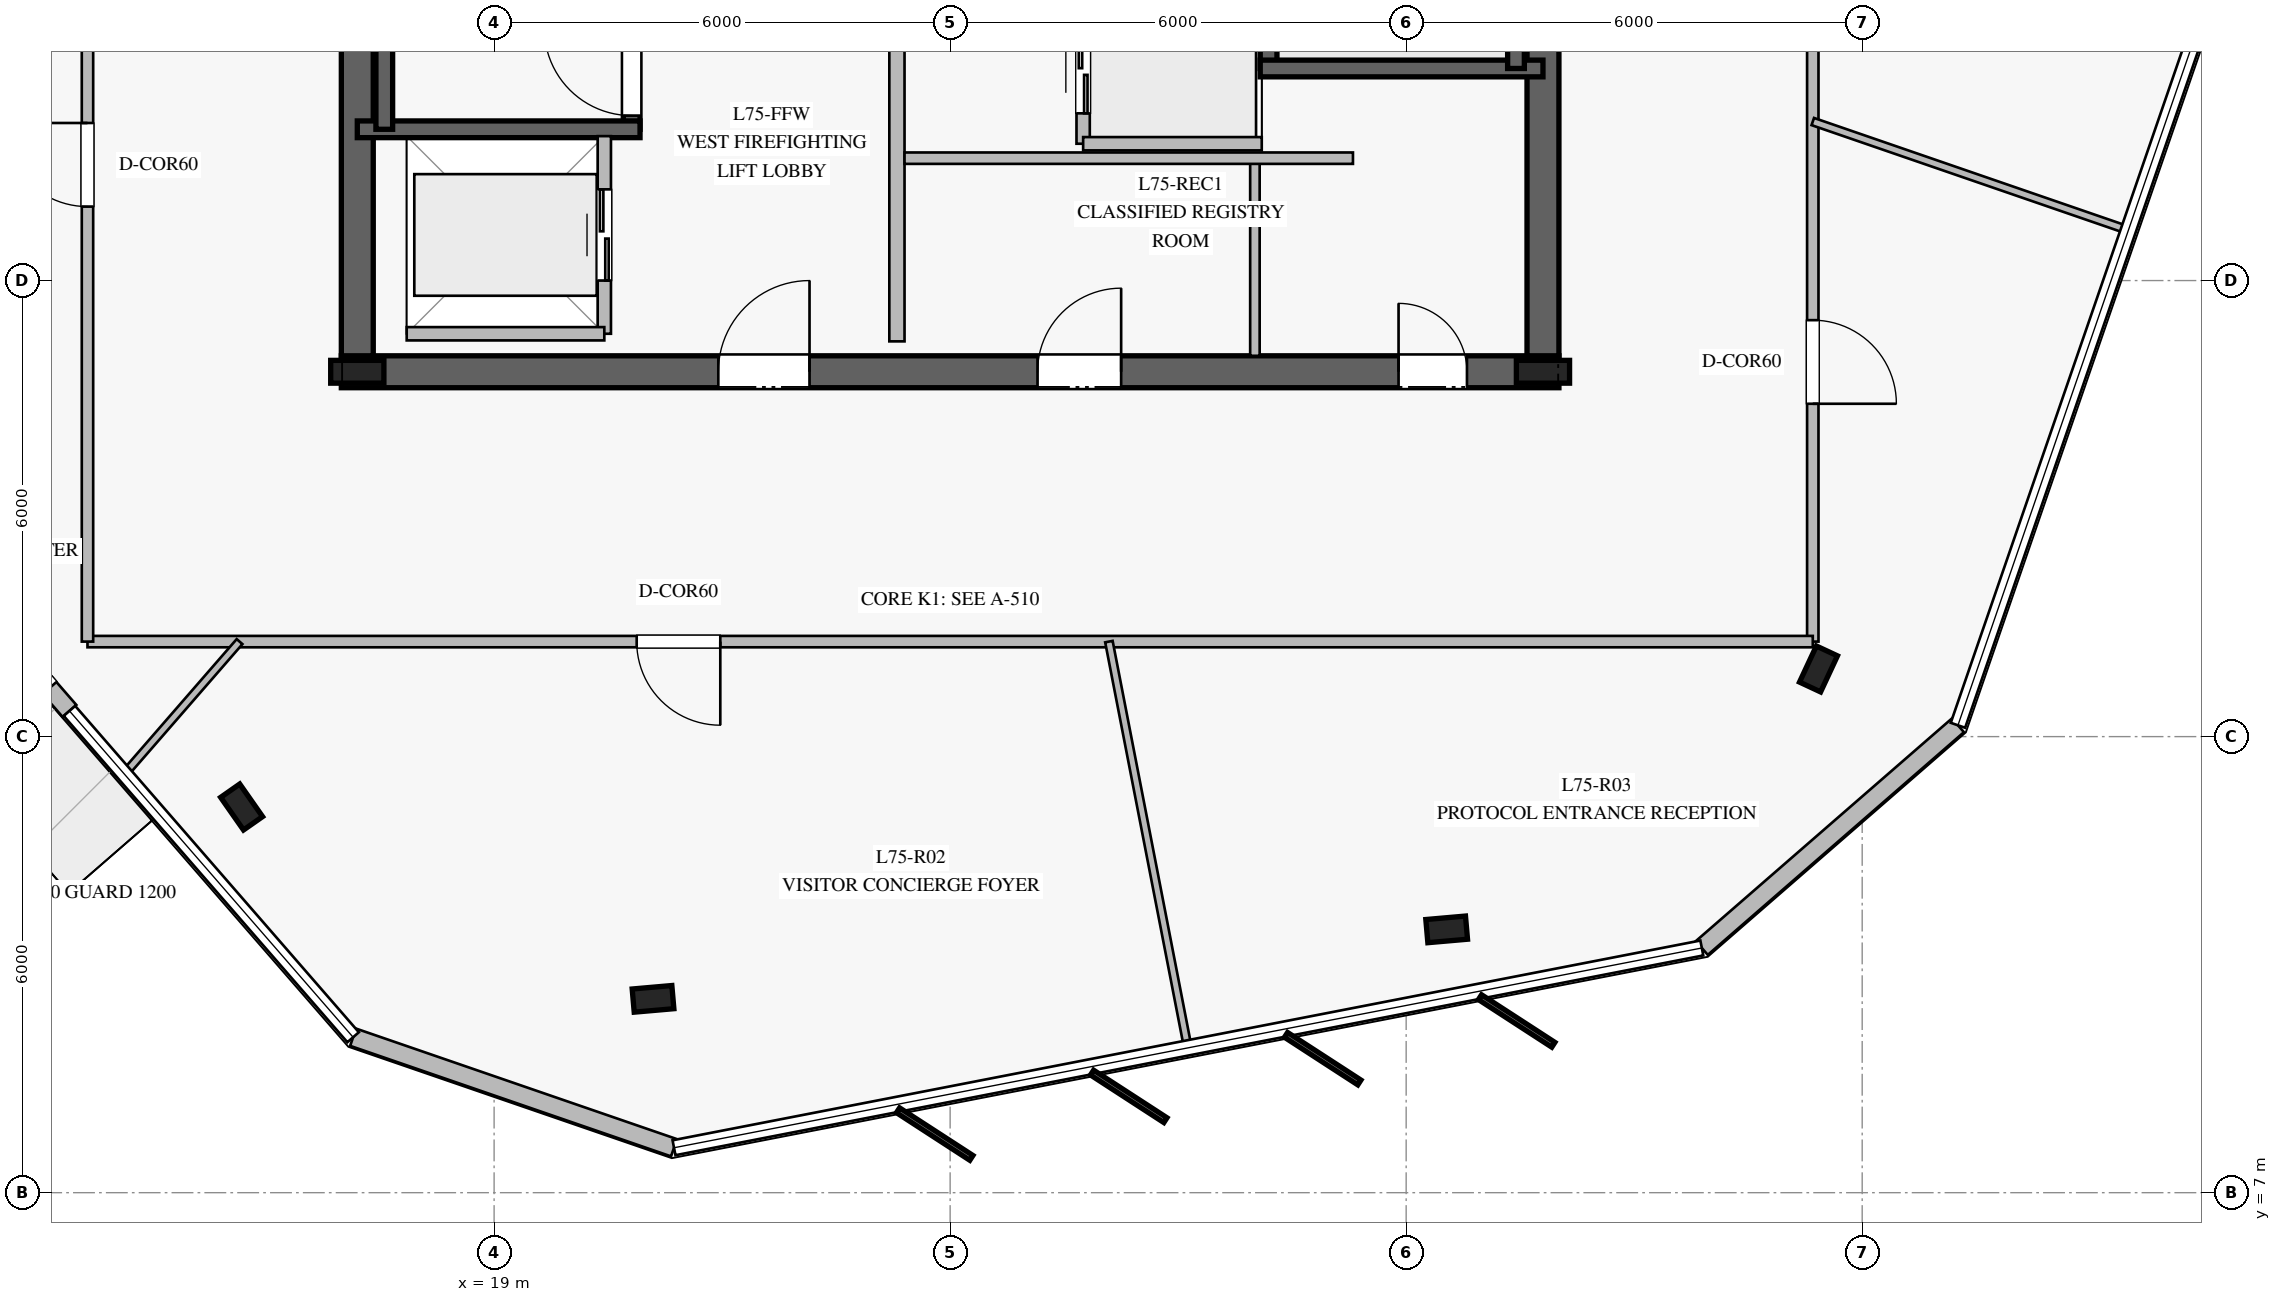
"""IFC4 building model, lengths in metres.
Left out: names, types, materials, properties, quantities, classifications, styles, units other than length and angle.
Written with IfcOpenShell. Run it as: python <this file> out.ifc"""

import sys

from ifc_helpers import new_model, si_unit, direction, frame, frame_2d, origin, origin_2d, place, context, subcontext, project, spatial, rectangle, i_section, extrude, element, fill, save


model = new_model("IFC4")
c1 = context("Model", 3, precision=1e-05, world=origin(), true_north=direction((0.0, 1.0)))
c2 = subcontext(c1, "Body", "Model", "MODEL_VIEW")
j1 = project(units=[si_unit("LENGTHUNIT", "METRE"), si_unit("PLANEANGLEUNIT", "RADIAN")], contexts=[c1])
p1 = place(None, origin())
s1 = spatial("IfcSite", under=j1, at=p1, CompositionType="ELEMENT")
p2 = place(p1, origin())
s2 = spatial("IfcBuilding", under=s1, at=p2, CompositionType="ELEMENT")
p3 = place(p2, frame((0.0, 0.0, 310.2)))
s3 = spatial("IfcBuildingStorey", under=s2, at=p3, CompositionType="ELEMENT", Elevation=310.2)
p4 = place(p3, frame((16.99, 17.8, 0.0), z_axis=(0.0, 0.0, 1.0), x_axis=(1.0, 0.0, 0.0)))
e1 = element("IfcWall", 1, at=p4, inside=s3, PredefinedType="SHEAR", context=c2, shape_type="SweptSolid", body=[
    extrude(rectangle(XDim=16.02, YDim=0.42, at=frame_2d((8.01, 0.0))), origin(), (0.0, 0.0, 1.0), 3.78),
])
p5 = place(p4, frame((4.96, 0.0, 0.0)))
e2 = element("IfcOpeningElement", 2, at=p5, cuts=e1, PredefinedType="OPENING", context=c2, shape_type="SweptSolid", body=[
    extrude(rectangle(XDim=1.2, YDim=2.25, at=frame_2d((0.6, 1.125))), frame((0.0, 0.22, 0.0), z_axis=(0.0, -1.0, 0.0), x_axis=(1.0, 0.0, 0.0)), (0.0, 0.0, 1.0), 0.44),
])
p6 = place(p4, frame((13.91, 0.0, 0.0)))
e3 = element("IfcOpeningElement", 3, at=p6, cuts=e1, PredefinedType="OPENING", context=c2, shape_type="SweptSolid", body=[
    extrude(rectangle(XDim=0.9, YDim=2.1, at=frame_2d((0.45, 1.05))), frame((0.0, 0.22, 0.0), z_axis=(0.0, -1.0, 0.0), x_axis=(1.0, 0.0, 0.0)), (0.0, 0.0, 1.0), 0.44),
])
p7 = place(p4, frame((9.16, 0.0, 0.0)))
e4 = element("IfcOpeningElement", 4, at=p7, cuts=e1, PredefinedType="OPENING", context=c2, shape_type="SweptSolid", body=[
    extrude(rectangle(XDim=1.1, YDim=2.2, at=frame_2d((0.55, 1.1))), frame((0.0, 0.22, 0.0), z_axis=(0.0, -1.0, 0.0), x_axis=(1.0, 0.0, 0.0)), (0.0, 0.0, 1.0), 0.44),
])
p8 = place(p3, frame((17.2, 31.99, 0.0), z_axis=(0.0, 0.0, 1.0), x_axis=(0.0, -1.0, 0.0)))
e5 = element("IfcWall", 5, at=p8, inside=s3, PredefinedType="SHEAR", context=c2, shape_type="SweptSolid", body=[
    extrude(rectangle(XDim=13.98, YDim=0.42, at=frame_2d((6.99, 0.0))), origin(), (0.0, 0.0, 1.0), 3.78),
])
p9 = place(p8, frame((2.14, 0.0, 0.0)))
e6 = element("IfcOpeningElement", 6, at=p9, cuts=e5, PredefinedType="OPENING", context=c2, shape_type="SweptSolid", body=[
    extrude(rectangle(XDim=1.5, YDim=2.2, at=frame_2d((0.75, 1.1))), frame((0.0, 0.22, 0.0), z_axis=(0.0, -1.0, 0.0), x_axis=(1.0, 0.0, 0.0)), (0.0, 0.0, 1.0), 0.44),
])
p10 = place(p3, frame((32.8, 18.01, 0.0), z_axis=(0.0, 0.0, 1.0), x_axis=(0.0, 1.0, 0.0)))
e7 = element("IfcWall", 7, at=p10, inside=s3, PredefinedType="SHEAR", context=c2, shape_type="SweptSolid", body=[
    extrude(rectangle(XDim=13.98, YDim=0.42, at=frame_2d((6.99, 0.0))), origin(), (0.0, 0.0, 1.0), 3.78),
])
for number, where, z_axis, x_axis in (
    (8, (17.2, 17.8, 0.0), (0.0, 0.0, 1.0), (1.0, 0.0, 0.0)),
    (9, (32.8, 17.8, 0.0), (0.0, 0.0, 1.0), (1.0, 0.0, 0.0)),
):
    element("IfcColumn", number, at=place(p3, frame(where, z_axis=z_axis, x_axis=x_axis)), inside=s3, PredefinedType="COLUMN", context=c2, shape_type="SweptSolid", body=[
        extrude(i_section(OverallWidth=0.3, OverallDepth=0.7, WebThickness=0.017, FlangeThickness=0.032, at=origin_2d()), origin(), (0.0, 0.0, 1.0), 4.0),
    ])
p11 = place(p3, frame((20.81, 20.99, 0.0), z_axis=(0.0, 0.0, 1.0), x_axis=(0.0, 1.0, 0.0)))
e10 = element("IfcWall", 10, at=p11, inside=s3, PredefinedType="SOLIDWALL", context=c2, shape_type="SweptSolid", body=[
    extrude(rectangle(XDim=7.22, YDim=0.22, at=frame_2d((3.61, 0.0))), origin(), (0.0, 0.0, 1.0), 3.78),
])
p12 = place(p11, frame((0.18, 0.0, 0.0)))
e11 = element("IfcOpeningElement", 11, at=p12, cuts=e10, PredefinedType="OPENING", context=c2, shape_type="SweptSolid", body=[
    extrude(rectangle(XDim=1.15, YDim=2.2, at=frame_2d((0.575, 1.1))), frame((0.0, 0.12, 0.0), z_axis=(0.0, -1.0, 0.0), x_axis=(1.0, 0.0, 0.0)), (0.0, 0.0, 1.0), 0.24),
])
p13 = place(p3, frame((17.2, 20.99, 0.0), z_axis=(0.0, 0.0, 1.0), x_axis=(1.0, 0.0, 0.0)))
e12 = element("IfcWall", 12, at=p13, inside=s3, PredefinedType="SOLIDWALL", context=c2, shape_type="SweptSolid", body=[
    extrude(rectangle(XDim=3.72, YDim=0.22, at=frame_2d((1.86, 0.0))), origin(), (0.0, 0.0, 1.0), 3.78),
])
p14 = place(p3, frame((17.555, 28.21, 0.0), z_axis=(0.0, 0.0, 1.0), x_axis=(0.0, -1.0, 0.0)))
e13 = element("IfcWall", 13, at=p14, inside=s3, PredefinedType="SOLIDWALL", context=c2, shape_type="SweptSolid", body=[
    extrude(rectangle(XDim=7.22, YDim=0.22, at=frame_2d((3.61, 0.0))), origin(), (0.0, 0.0, 1.0), 3.78),
])
p15 = place(p3, frame((29.19, 21.79, 0.0), z_axis=(0.0, 0.0, 1.0), x_axis=(0.0, 1.0, 0.0)))
e14 = element("IfcWall", 14, at=p15, inside=s3, PredefinedType="SOLIDWALL", context=c2, shape_type="SweptSolid", body=[
    extrude(rectangle(XDim=7.22, YDim=0.22, at=frame_2d((3.61, 0.0))), origin(), (0.0, 0.0, 1.0), 3.78),
])
p16 = place(p15, frame((5.88, 0.0, 0.0)))
e15 = element("IfcOpeningElement", 15, at=p16, cuts=e14, PredefinedType="OPENING", context=c2, shape_type="SweptSolid", body=[
    extrude(rectangle(XDim=1.15, YDim=2.2, at=frame_2d((0.575, 1.1))), frame((0.0, 0.12, 0.0), z_axis=(0.0, -1.0, 0.0), x_axis=(1.0, 0.0, 0.0)), (0.0, 0.0, 1.0), 0.24),
])
p17 = place(p3, frame((29.08, 21.79, 0.0), z_axis=(0.0, 0.0, 1.0), x_axis=(1.0, 0.0, 0.0)))
e16 = element("IfcWall", 16, at=p17, inside=s3, PredefinedType="SOLIDWALL", context=c2, shape_type="SweptSolid", body=[
    extrude(rectangle(XDim=3.72, YDim=0.22, at=frame_2d((1.86, 0.0))), origin(), (0.0, 0.0, 1.0), 3.78),
])
p18 = place(p3, frame((32.445, 29.01, 0.0), z_axis=(0.0, 0.0, 1.0), x_axis=(0.0, -1.0, 0.0)))
e17 = element("IfcWall", 17, at=p18, inside=s3, PredefinedType="SOLIDWALL", context=c2, shape_type="SweptSolid", body=[
    extrude(rectangle(XDim=7.22, YDim=0.22, at=frame_2d((3.61, 0.0))), origin(), (0.0, 0.0, 1.0), 3.78),
])
for number, where, z_axis, x_axis in (
    (18, (15.678, 12.074, 0.0), (0.0, 0.0, 1.0), (-0.574, 0.819, 0.0)),
    (19, (21.091, 9.55, 0.0), (0.0, 0.0, 1.0), (0.996, 0.087, 0.0)),
    (20, (31.533, 10.464, 0.0), (0.0, 0.0, 1.0), (0.996, 0.087, 0.0)),
    (21, (36.425, 13.89, 0.0), (0.0, 0.0, 1.0), (0.423, 0.906, 0.0)),
):
    element("IfcColumn", number, at=place(p3, frame(where, z_axis=z_axis, x_axis=x_axis)), inside=s3, PredefinedType="COLUMN", context=c2, shape_type="SweptSolid", body=[
        extrude(i_section(OverallWidth=0.306, OverallDepth=0.524, WebThickness=0.021, FlangeThickness=0.04, at=origin_2d()), origin(), (0.0, 0.0, 1.0), 4.0),
    ])
p19 = place(p3, frame((11.839, 15.149, 0.0), z_axis=(0.0, 0.0, 1.0), x_axis=(0.655979683466, -0.754778546913, 0.0)))
e22 = element("IfcWall", 22, at=p19, inside=s3, PredefinedType="STANDARD", context=c2, shape_type="SweptSolid", body=[
    extrude(rectangle(XDim=2.399, YDim=0.24, at=frame_2d((1.2, 0.0))), origin(), (0.0, 0.0, 1.0), 3.78),
])
p20 = place(p19, frame((0.4, 0.0, 0.0)))
e23 = element("IfcOpeningElement", 23, at=p20, cuts=e22, PredefinedType="OPENING", context=c2, shape_type="SweptSolid", body=[
    extrude(rectangle(XDim=1.6, YDim=2.25, at=frame_2d((0.8, 1.125))), frame((0.0, 0.13, 0.0), z_axis=(0.0, -1.0, 0.0), x_axis=(1.0, 0.0, 0.0)), (0.0, 0.0, 1.0), 0.26),
])
p21 = place(p3, frame((17.145, 9.045, 0.0), z_axis=(0.0, 0.0, 1.0), x_axis=(0.945509443057, -0.325594676077, 0.0)))
e24 = element("IfcWall", 24, at=p21, inside=s3, PredefinedType="STANDARD", context=c2, shape_type="SweptSolid", body=[
    extrude(rectangle(XDim=4.465, YDim=0.24, at=frame_2d((2.233, 0.0))), origin(), (0.0, 0.0, 1.0), 3.78),
])
p22 = place(p3, frame((34.89, 10.219, 0.0), z_axis=(0.0, 0.0, 1.0), x_axis=(0.754672605899, 0.656101560663, 0.0)))
e25 = element("IfcWall", 25, at=p22, inside=s3, PredefinedType="STANDARD", context=c2, shape_type="SweptSolid", body=[
    extrude(rectangle(XDim=4.466, YDim=0.24, at=frame_2d((2.233, 0.0))), origin(), (0.0, 0.0, 1.0), 3.78),
])
p23 = place(p3, frame((24.3, 18.2, 0.0), z_axis=(0.0, 0.0, 1.0), x_axis=(0.0, 1.0, 0.0)))
e26 = element("IfcWall", 26, at=p23, inside=s3, PredefinedType="PARTITIONING", context=c2, shape_type="SweptSolid", body=[
    extrude(rectangle(XDim=5.15, YDim=0.2, at=frame_2d((2.575, 0.0))), origin(), (0.0, 0.0, 1.0), 3.78),
])
p24 = place(p3, frame((29.01, 18.01, 0.0), z_axis=(0.0, 0.0, 1.0), x_axis=(0.0, 1.0, 0.0)))
e27 = element("IfcWall", 27, at=p24, inside=s3, PredefinedType="PARTITIONING", context=c2, shape_type="SweptSolid", body=[
    extrude(rectangle(XDim=2.54, YDim=0.125, at=frame_2d((1.27, 0.0))), origin(), (0.0, 0.0, 1.0), 3.78),
])
p25 = place(p3, frame((24.4, 20.61, 0.0), z_axis=(0.0, 0.0, 1.0), x_axis=(1.0, 0.0, 0.0)))
e28 = element("IfcWall", 28, at=p25, inside=s3, PredefinedType="PARTITIONING", context=c2, shape_type="SweptSolid", body=[
    extrude(rectangle(XDim=5.9, YDim=0.15, at=frame_2d((2.95, 0.0))), origin(), (0.0, 0.0, 1.0), 3.78),
])
p26 = place(p3, frame((26.75, 20.8, 0.0), z_axis=(0.0, 0.0, 1.0), x_axis=(0.0, 1.0, 0.0)))
e29 = element("IfcWall", 29, at=p26, inside=s3, PredefinedType="PARTITIONING", context=c2, shape_type="SweptSolid", body=[
    extrude(rectangle(XDim=1.9, YDim=0.175, at=frame_2d((0.95, 0.0))), origin(), (0.0, 0.0, 1.0), 3.78),
])
p27 = place(p26, frame((0.4, 0.0, 0.0)))
e30 = element("IfcOpeningElement", 30, at=p27, cuts=e29, PredefinedType="OPENING", context=c2, shape_type="SweptSolid", body=[
    extrude(rectangle(XDim=1.1, YDim=2.2, at=frame_2d((0.55, 1.1))), frame((0.0, 0.098, 0.0), z_axis=(0.0, -1.0, 0.0), x_axis=(1.0, 0.0, 0.0)), (0.0, 0.0, 1.0), 0.195),
])
p28 = place(p3, frame((26.75, 20.8, 0.0), z_axis=(0.0, 0.0, 1.0), x_axis=(1.0, 0.0, 0.0)))
e31 = element("IfcWall", 31, at=p28, inside=s3, PredefinedType="PARTITIONING", context=c2, shape_type="SweptSolid", body=[
    extrude(rectangle(XDim=2.35, YDim=0.175, at=frame_2d((1.175, 0.0))), origin(), (0.0, 0.0, 1.0), 3.78),
])
p29 = place(p3, frame((20.45, 18.3, 0.0), z_axis=(0.0, 0.0, 1.0), x_axis=(0.0, 1.0, 0.0)))
e32 = element("IfcWall", 32, at=p29, inside=s3, PredefinedType="PARTITIONING", context=c2, shape_type="SweptSolid", body=[
    extrude(rectangle(XDim=2.6, YDim=0.175, at=frame_2d((1.3, 0.0))), origin(), (0.0, 0.0, 1.0), 3.78),
])
p30 = place(p29, frame((0.7, 0.0, 0.0)))
e33 = element("IfcOpeningElement", 33, at=p30, cuts=e32, PredefinedType="OPENING", context=c2, shape_type="SweptSolid", body=[
    extrude(rectangle(XDim=1.2, YDim=2.2, at=frame_2d((0.6, 1.1))), frame((0.0, 0.098, 0.0), z_axis=(0.0, -1.0, 0.0), x_axis=(1.0, 0.0, 0.0)), (0.0, 0.0, 1.0), 0.195),
])
p31 = place(p3, frame((17.85, 18.3, 0.0), z_axis=(0.0, 0.0, 1.0), x_axis=(1.0, 0.0, 0.0)))
e34 = element("IfcWall", 34, at=p31, inside=s3, PredefinedType="PARTITIONING", context=c2, shape_type="SweptSolid", body=[
    extrude(rectangle(XDim=2.6, YDim=0.175, at=frame_2d((1.3, 0.0))), origin(), (0.0, 0.0, 1.0), 3.78),
])
p32 = place(p3, frame((36.35, 35.75, 0.0), z_axis=(0.0, 0.0, 1.0), x_axis=(0.0, -1.0, 0.0)))
e35 = element("IfcWall", 35, at=p32, inside=s3, PredefinedType="PARTITIONING", context=c2, shape_type="SweptSolid", body=[
    extrude(rectangle(XDim=21.5, YDim=0.15, at=frame_2d((10.75, 0.0))), origin(), (0.0, 0.0, 1.0), 3.28),
])
p33 = place(p32, frame((17.271, 0.0, 0.0)))
e36 = element("IfcOpeningElement", 36, at=p33, cuts=e35, PredefinedType="OPENING", context=c2, shape_type="SweptSolid", body=[
    extrude(rectangle(XDim=1.1, YDim=2.2, at=frame_2d((0.55, 1.1))), frame((0.0, 0.085, 0.0), z_axis=(0.0, -1.0, 0.0), x_axis=(1.0, 0.0, 0.0)), (0.0, 0.0, 1.0), 0.17),
])
p34 = place(p32, frame((8.452, 0.0, 0.0)))
e37 = element("IfcOpeningElement", 37, at=p34, cuts=e35, PredefinedType="OPENING", context=c2, shape_type="SweptSolid", body=[
    extrude(rectangle(XDim=1.1, YDim=2.2, at=frame_2d((0.55, 1.1))), frame((0.0, 0.085, 0.0), z_axis=(0.0, -1.0, 0.0), x_axis=(1.0, 0.0, 0.0)), (0.0, 0.0, 1.0), 0.17),
])
p35 = place(p3, frame((36.35, 14.25, 0.0), z_axis=(0.0, 0.0, 1.0), x_axis=(-1.0, 0.0, 0.0)))
e38 = element("IfcWall", 38, at=p35, inside=s3, PredefinedType="PARTITIONING", context=c2, shape_type="SweptSolid", body=[
    extrude(rectangle(XDim=22.7, YDim=0.15, at=frame_2d((11.35, 0.0))), origin(), (0.0, 0.0, 1.0), 3.28),
])
p36 = place(p35, frame((14.374, 0.0, 0.0)))
e39 = element("IfcOpeningElement", 39, at=p36, cuts=e38, PredefinedType="OPENING", context=c2, shape_type="SweptSolid", body=[
    extrude(rectangle(XDim=1.1, YDim=2.2, at=frame_2d((0.55, 1.1))), frame((0.0, 0.085, 0.0), z_axis=(0.0, -1.0, 0.0), x_axis=(1.0, 0.0, 0.0)), (0.0, 0.0, 1.0), 0.17),
])
p37 = place(p3, frame((13.65, 14.25, 0.0), z_axis=(0.0, 0.0, 1.0), x_axis=(0.0, 1.0, 0.0)))
e40 = element("IfcWall", 40, at=p37, inside=s3, PredefinedType="PARTITIONING", context=c2, shape_type="SweptSolid", body=[
    extrude(rectangle(XDim=21.5, YDim=0.15, at=frame_2d((10.75, 0.0))), origin(), (0.0, 0.0, 1.0), 3.28),
])
p38 = place(p37, frame((5.723, 0.0, 0.0)))
e41 = element("IfcOpeningElement", 41, at=p38, cuts=e40, PredefinedType="OPENING", context=c2, shape_type="SweptSolid", body=[
    extrude(rectangle(XDim=1.1, YDim=2.2, at=frame_2d((0.55, 1.1))), frame((0.0, 0.085, 0.0), z_axis=(0.0, -1.0, 0.0), x_axis=(1.0, 0.0, 0.0)), (0.0, 0.0, 1.0), 0.17),
])
p39 = place(p3, frame((15.651, 14.25, 0.0), z_axis=(0.0, 0.0, 1.0), x_axis=(-0.656104924623, -0.754669681308, 0.0)))
e42 = element("IfcWall", 42, at=p39, inside=s3, PredefinedType="MOVABLE", context=c2, shape_type="SweptSolid", body=[
    extrude(rectangle(XDim=2.294, YDim=0.1, at=frame_2d((1.147, 0.0))), origin(), (0.0, 0.0, 1.0), 3.28),
])
p40 = place(p3, frame((27.089, 14.25, 0.0), z_axis=(0.0, 0.0, 1.0), x_axis=(0.190811881925, -0.981626622355, 0.0)))
e43 = element("IfcWall", 43, at=p40, inside=s3, PredefinedType="MOVABLE", context=c2, shape_type="SweptSolid", body=[
    extrude(rectangle(XDim=5.429, YDim=0.1, at=frame_2d((2.714, 0.0))), origin(), (0.0, 0.0, 1.0), 3.28),
])
p41 = place(p3, frame((36.35, 21.092, 0.0), z_axis=(0.0, 0.0, 1.0), x_axis=(0.94547788529, -0.325686303714, 0.0)))
e44 = element("IfcWall", 44, at=p41, inside=s3, PredefinedType="MOVABLE", context=c2, shape_type="SweptSolid", body=[
    extrude(rectangle(XDim=4.375, YDim=0.1, at=frame_2d((2.188, 0.0))), origin(), (0.0, 0.0, 1.0), 3.28),
])
p42 = place(p12, origin())
e45 = element("IfcDoor", 45, at=p42, inside=s3, OperationType="SINGLE_SWING_RIGHT", PredefinedType="DOOR", context=c2, shape_type="SweptSolid", body=[
    extrude(rectangle(XDim=1.15, YDim=2.2, at=frame_2d((0.575, 1.1))), frame((0.0, 0.025, 0.0), z_axis=(0.0, -1.0, 0.0), x_axis=(1.0, 0.0, 0.0)), (0.0, 0.0, 1.0), 0.05),
])
fill(e11, e45)
p43 = place(p5, origin())
e46 = element("IfcDoor", 46, at=p43, inside=s3, OperationType="SINGLE_SWING_RIGHT", PredefinedType="DOOR", context=c2, shape_type="SweptSolid", body=[
    extrude(rectangle(XDim=1.2, YDim=2.25, at=frame_2d((0.6, 1.125))), frame((0.0, 0.025, 0.0), z_axis=(0.0, -1.0, 0.0), x_axis=(1.0, 0.0, 0.0)), (0.0, 0.0, 1.0), 0.05),
])
fill(e2, e46)
p44 = place(p6, origin())
e47 = element("IfcDoor", 47, at=p44, inside=s3, OperationType="SINGLE_SWING_LEFT", PredefinedType="DOOR", context=c2, shape_type="SweptSolid", body=[
    extrude(rectangle(XDim=0.9, YDim=2.1, at=frame_2d((0.45, 1.05))), frame((0.0, 0.025, 0.0), z_axis=(0.0, -1.0, 0.0), x_axis=(1.0, 0.0, 0.0)), (0.0, 0.0, 1.0), 0.05),
])
fill(e3, e47)
p45 = place(p7, origin())
e48 = element("IfcDoor", 48, at=p45, inside=s3, OperationType="SINGLE_SWING_RIGHT", PredefinedType="DOOR", context=c2, shape_type="SweptSolid", body=[
    extrude(rectangle(XDim=1.1, YDim=2.2, at=frame_2d((0.55, 1.1))), frame((0.0, 0.025, 0.0), z_axis=(0.0, -1.0, 0.0), x_axis=(1.0, 0.0, 0.0)), (0.0, 0.0, 1.0), 0.05),
])
fill(e4, e48)
p46 = place(p27, origin())
e49 = element("IfcDoor", 49, at=p46, inside=s3, OperationType="DOUBLE_DOOR_SLIDING", PredefinedType="DOOR", context=c2, shape_type="SweptSolid", body=[
    extrude(rectangle(XDim=1.1, YDim=2.2, at=frame_2d((0.55, 1.1))), frame((0.0, 0.025, 0.0), z_axis=(0.0, -1.0, 0.0), x_axis=(1.0, 0.0, 0.0)), (0.0, 0.0, 1.0), 0.05),
])
fill(e30, e49)
p47 = place(p30, origin())
e50 = element("IfcDoor", 50, at=p47, inside=s3, OperationType="DOUBLE_DOOR_SLIDING", PredefinedType="DOOR", context=c2, shape_type="SweptSolid", body=[
    extrude(rectangle(XDim=1.2, YDim=2.2, at=frame_2d((0.6, 1.1))), frame((0.0, 0.025, 0.0), z_axis=(0.0, -1.0, 0.0), x_axis=(1.0, 0.0, 0.0)), (0.0, 0.0, 1.0), 0.05),
])
fill(e33, e50)
p48 = place(p38, origin())
e51 = element("IfcDoor", 51, at=p48, inside=s3, OperationType="SINGLE_SWING_RIGHT", PredefinedType="DOOR", context=c2, shape_type="SweptSolid", body=[
    extrude(rectangle(XDim=1.1, YDim=2.2, at=frame_2d((0.55, 1.1))), frame((0.0, 0.025, 0.0), z_axis=(0.0, -1.0, 0.0), x_axis=(1.0, 0.0, 0.0)), (0.0, 0.0, 1.0), 0.05),
])
fill(e41, e51)
p49 = place(p36, origin())
e52 = element("IfcDoor", 52, at=p49, inside=s3, OperationType="SINGLE_SWING_LEFT", PredefinedType="DOOR", context=c2, shape_type="SweptSolid", body=[
    extrude(rectangle(XDim=1.1, YDim=2.2, at=frame_2d((0.55, 1.1))), frame((0.0, 0.025, 0.0), z_axis=(0.0, -1.0, 0.0), x_axis=(1.0, 0.0, 0.0)), (0.0, 0.0, 1.0), 0.05),
])
fill(e39, e52)
p50 = place(p33, origin())
e53 = element("IfcDoor", 53, at=p50, inside=s3, OperationType="SINGLE_SWING_RIGHT", PredefinedType="DOOR", context=c2, shape_type="SweptSolid", body=[
    extrude(rectangle(XDim=1.1, YDim=2.2, at=frame_2d((0.55, 1.1))), frame((0.0, 0.025, 0.0), z_axis=(0.0, -1.0, 0.0), x_axis=(1.0, 0.0, 0.0)), (0.0, 0.0, 1.0), 0.05),
])
fill(e36, e53)
save(model, sys.argv[1])
